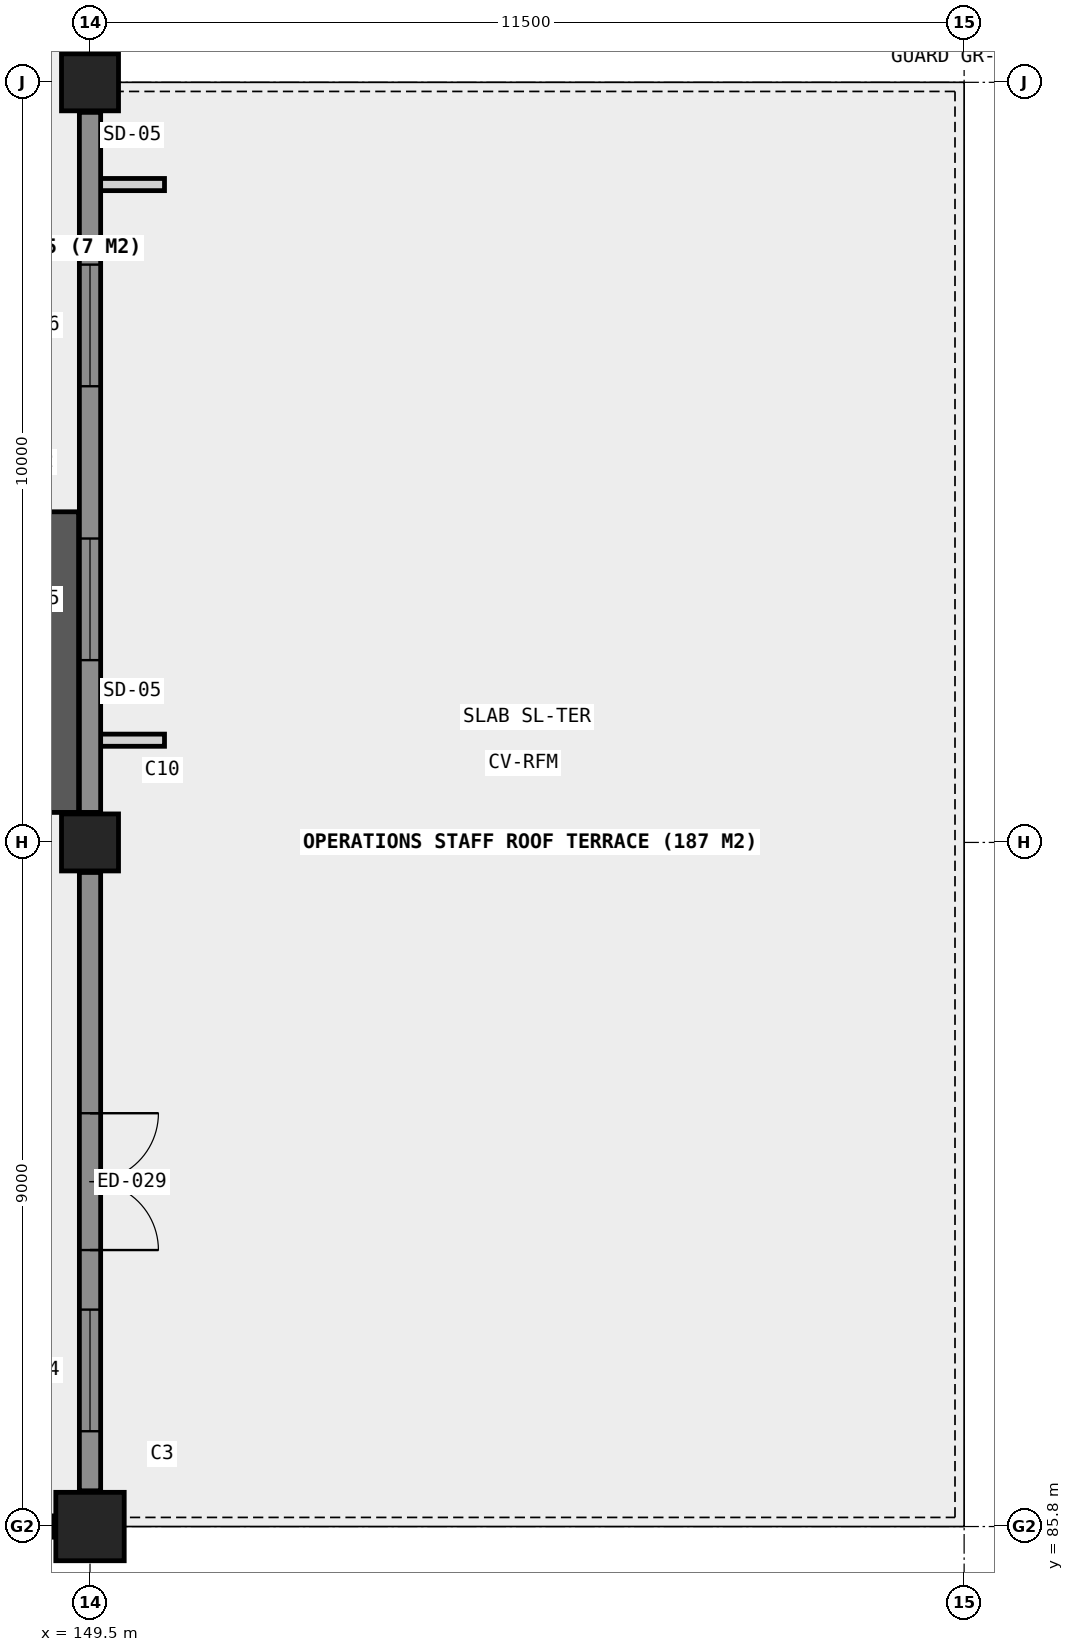
"""IFC4 building model, lengths in metres.
Left out: names, types, materials, properties, quantities, classifications, styles, units other than length and angle.
Written with IfcOpenShell. Run it as: python <this file> out.ifc"""

import sys

from ifc_helpers import new_model, si_unit, direction, frame, frame_2d, origin, origin_2d, place, context, subcontext, project, spatial, rectangle, circle, extrude, element, fill, save


model = new_model("IFC4")
c1 = context("Model", 3, precision=1e-05, world=origin(), true_north=direction((0.0, 1.0)))
c2 = subcontext(c1, "Body", "Model", "MODEL_VIEW")
j1 = project(units=[si_unit("LENGTHUNIT", "METRE"), si_unit("PLANEANGLEUNIT", "RADIAN")], contexts=[c1])
p1 = place(None, origin())
s1 = spatial("IfcSite", under=j1, at=p1, CompositionType="ELEMENT")
p2 = place(p1, origin())
s2 = spatial("IfcBuilding", under=s1, at=p2, CompositionType="ELEMENT")
p3 = place(p2, frame((0.0, 0.0, 22.46)))
s3 = spatial("IfcBuildingStorey", under=s2, at=p3, CompositionType="ELEMENT", Elevation=22.46)
p4 = place(p3, frame((149.5, 85.8, 0.0), z_axis=(0.0, 0.0, 1.0), x_axis=(1.0, 0.0, 0.0)))
e1 = element("IfcColumn", 1, at=p4, inside=s3, PredefinedType="COLUMN", context=c2, shape_type="SweptSolid", body=[
    extrude(rectangle(XDim=0.9, YDim=0.9, at=origin_2d()), origin(), (0.0, 0.0, 1.0), 4.44),
])
for number, where, z_axis, x_axis in (
    (2, (149.5, 94.8, 0.0), (0.0, 0.0, 1.0), (1.0, 0.0, 0.0)),
    (3, (149.5, 104.8, 0.0), (0.0, 0.0, 1.0), (1.0, 0.0, 0.0)),
):
    element("IfcColumn", number, at=place(p3, frame(where, z_axis=z_axis, x_axis=x_axis)), inside=s3, PredefinedType="COLUMN", context=c2, shape_type="SweptSolid", body=[
        extrude(circle(Radius=0.375, at=origin_2d()), origin(), (0.0, 0.0, 1.0), 4.44),
    ])
p5 = place(p3, frame((149.15, 95.195, 0.0), z_axis=(0.0, 0.0, 1.0), x_axis=(0.0, 1.0, 0.0)))
e4 = element("IfcWall", 4, at=p5, inside=s3, PredefinedType="SHEAR", context=c2, shape_type="SweptSolid", body=[
    extrude(rectangle(XDim=3.955, YDim=0.4, at=frame_2d((1.978, 0.0))), origin(), (0.0, 0.0, 1.0), 4.44),
])
p6 = place(p3, frame((148.68, 85.8, 0.0), z_axis=(0.0, 0.0, 1.0), x_axis=(1.0, 0.0, 0.0)))
e5 = element("IfcWall", 5, at=p6, inside=s3, PredefinedType="SOLIDWALL", context=c2, shape_type="SweptSolid", body=[
    extrude(rectangle(XDim=0.35, YDim=0.28, at=frame_2d((0.175, 0.0))), origin(), (0.0, 0.0, 1.0), 4.15),
])
p7 = place(p3, frame((149.5, 86.27, 0.0), z_axis=(0.0, 0.0, 1.0), x_axis=(0.0, 1.0, 0.0)))
e6 = element("IfcWall", 6, at=p7, inside=s3, PredefinedType="SOLIDWALL", context=c2, shape_type="SweptSolid", body=[
    extrude(rectangle(XDim=8.135, YDim=0.28, at=frame_2d((4.067, 0.0))), origin(), (0.0, 0.0, 1.0), 3.36),
])
p8 = place(p7, frame((3.167, 0.0, 0.0)))
e7 = element("IfcOpeningElement", 7, at=p8, cuts=e6, PredefinedType="OPENING", context=c2, shape_type="SweptSolid", body=[
    extrude(rectangle(XDim=1.8, YDim=2.25, at=frame_2d((0.9, 1.125))), frame((0.0, 0.15, 0.0), z_axis=(0.0, -1.0, 0.0), x_axis=(1.0, 0.0, 0.0)), (0.0, 0.0, 1.0), 0.3),
])
p9 = place(p7, frame((0.784, 0.0, 0.78)))
e8 = element("IfcOpeningElement", 8, at=p9, cuts=e6, PredefinedType="OPENING", context=c2, shape_type="SweptSolid", body=[
    extrude(rectangle(XDim=1.6, YDim=1.6, at=frame_2d((0.8, 0.8))), frame((0.0, 0.15, 0.0), z_axis=(0.0, -1.0, 0.0), x_axis=(1.0, 0.0, 0.0)), (0.0, 0.0, 1.0), 0.3),
])
p10 = place(p3, frame((149.5, 95.195, 0.0), z_axis=(0.0, 0.0, 1.0), x_axis=(0.0, 1.0, 0.0)))
e9 = element("IfcWall", 9, at=p10, inside=s3, PredefinedType="SOLIDWALL", context=c2, shape_type="SweptSolid", body=[
    extrude(rectangle(XDim=9.21, YDim=0.28, at=frame_2d((4.605, 0.0))), origin(), (0.0, 0.0, 1.0), 3.36),
])
p11 = place(p10, frame((2.003, 0.0, 0.85)))
e10 = element("IfcOpeningElement", 10, at=p11, cuts=e9, PredefinedType="OPENING", context=c2, shape_type="SweptSolid", body=[
    extrude(rectangle(XDim=1.6, YDim=1.6, at=frame_2d((0.8, 0.8))), frame((0.0, 0.15, 0.0), z_axis=(0.0, -1.0, 0.0), x_axis=(1.0, 0.0, 0.0)), (0.0, 0.0, 1.0), 0.3),
])
p12 = place(p10, frame((5.607, 0.0, 0.85)))
e11 = element("IfcOpeningElement", 11, at=p12, cuts=e9, PredefinedType="OPENING", context=c2, shape_type="SweptSolid", body=[
    extrude(rectangle(XDim=1.6, YDim=1.6, at=frame_2d((0.8, 0.8))), frame((0.0, 0.15, 0.0), z_axis=(0.0, -1.0, 0.0), x_axis=(1.0, 0.0, 0.0)), (0.0, 0.0, 1.0), 0.3),
])
p13 = place(p3, frame((149.5, 105.195, 0.0), z_axis=(0.0, 0.0, 1.0), x_axis=(0.0, 1.0, 0.0)))
e12 = element("IfcWall", 12, at=p13, inside=s3, PredefinedType="SOLIDWALL", context=c2, shape_type="SweptSolid", body=[
    extrude(rectangle(XDim=9.21, YDim=0.28, at=frame_2d((4.605, 0.0))), origin(), (0.0, 0.0, 1.0), 3.36),
])
p14 = place(p13, frame((2.003, 0.0, 0.85)))
e13 = element("IfcOpeningElement", 13, at=p14, cuts=e12, PredefinedType="OPENING", context=c2, shape_type="SweptSolid", body=[
    extrude(rectangle(XDim=1.6, YDim=1.6, at=frame_2d((0.8, 0.8))), frame((0.0, 0.15, 0.0), z_axis=(0.0, -1.0, 0.0), x_axis=(1.0, 0.0, 0.0)), (0.0, 0.0, 1.0), 0.3),
])
p15 = place(p13, frame((5.607, 0.0, 0.85)))
e14 = element("IfcOpeningElement", 14, at=p15, cuts=e12, PredefinedType="OPENING", context=c2, shape_type="SweptSolid", body=[
    extrude(rectangle(XDim=1.6, YDim=1.6, at=frame_2d((0.8, 0.8))), frame((0.0, 0.15, 0.0), z_axis=(0.0, -1.0, 0.0), x_axis=(1.0, 0.0, 0.0)), (0.0, 0.0, 1.0), 0.3),
])
p16 = place(p8, frame((0.9, 0.0, 0.0), z_axis=(0.0, 0.0, 1.0), x_axis=(-1.0, 0.0, 0.0)))
e15 = element("IfcDoor", 15, at=p16, inside=s3, OperationType="DOUBLE_DOOR_SINGLE_SWING", PredefinedType="DOOR", context=c2, shape_type="SweptSolid", body=[
    extrude(rectangle(XDim=1.8, YDim=2.25, at=frame_2d((0.0, 1.125))), frame((0.0, 0.025, 0.0), z_axis=(0.0, -1.0, 0.0), x_axis=(1.0, 0.0, 0.0)), (0.0, 0.0, 1.0), 0.05),
])
fill(e7, e15)
p17 = place(p9, origin())
e16 = element("IfcWindow", 16, at=p17, inside=s3, PartitioningType="SINGLE_PANEL", PredefinedType="WINDOW", context=c2, shape_type="SweptSolid", body=[
    extrude(rectangle(XDim=1.6, YDim=1.6, at=frame_2d((0.8, 0.8))), frame((0.0, 0.03, 0.0), z_axis=(0.0, -1.0, 0.0), x_axis=(1.0, 0.0, 0.0)), (0.0, 0.0, 1.0), 0.06),
])
fill(e8, e16)
p18 = place(p11, origin())
e17 = element("IfcWindow", 17, at=p18, inside=s3, PartitioningType="SINGLE_PANEL", PredefinedType="WINDOW", context=c2, shape_type="SweptSolid", body=[
    extrude(rectangle(XDim=1.6, YDim=1.6, at=frame_2d((0.8, 0.8))), frame((0.0, 0.03, 0.0), z_axis=(0.0, -1.0, 0.0), x_axis=(1.0, 0.0, 0.0)), (0.0, 0.0, 1.0), 0.06),
])
fill(e10, e17)
p19 = place(p12, origin())
e18 = element("IfcWindow", 18, at=p19, inside=s3, PartitioningType="SINGLE_PANEL", PredefinedType="WINDOW", context=c2, shape_type="SweptSolid", body=[
    extrude(rectangle(XDim=1.6, YDim=1.6, at=frame_2d((0.8, 0.8))), frame((0.0, 0.03, 0.0), z_axis=(0.0, -1.0, 0.0), x_axis=(1.0, 0.0, 0.0)), (0.0, 0.0, 1.0), 0.06),
])
fill(e11, e18)
save(model, sys.argv[1])
